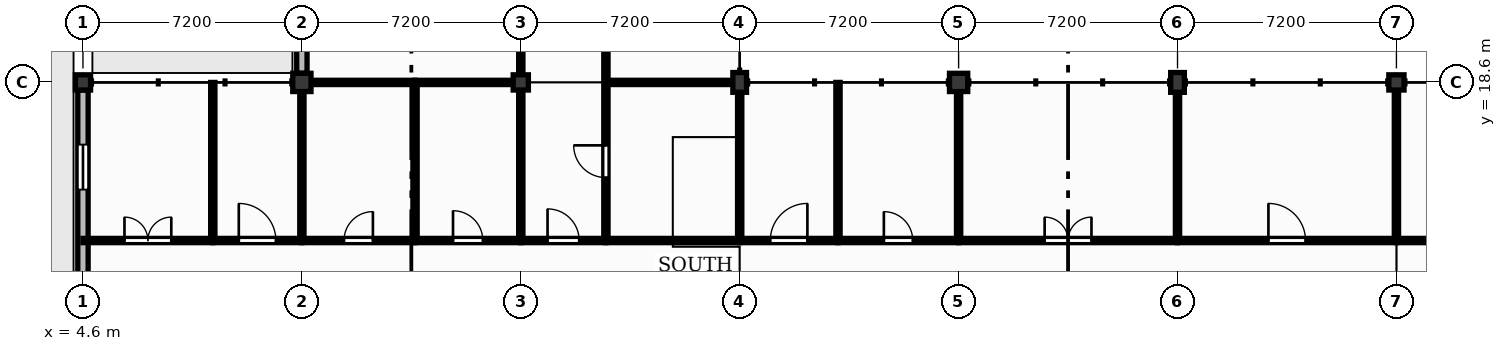
"""IFC4 building model, lengths in metres.
Left out: names, types, materials, properties, quantities, classifications, styles, units other than length and angle.
Written with IfcOpenShell. Run it as: python <this file> out.ifc"""

import sys

from ifc_helpers import new_model, si_unit, direction, frame, frame_2d, origin, origin_2d, place, context, subcontext, project, spatial, rectangle, extrude, element, fill, save


model = new_model("IFC4")
c1 = context("Model", 3, precision=1e-05, world=origin(), true_north=direction((0.0, 1.0)))
c2 = subcontext(c1, "Body", "Model", "MODEL_VIEW")
j1 = project(units=[si_unit("LENGTHUNIT", "METRE"), si_unit("PLANEANGLEUNIT", "RADIAN")], contexts=[c1])
p1 = place(None, origin())
s1 = spatial("IfcSite", under=j1, at=p1, CompositionType="ELEMENT")
p2 = place(p1, origin())
s2 = spatial("IfcBuilding", under=s1, at=p2, CompositionType="ELEMENT")
p3 = place(p2, origin())
s3 = spatial("IfcBuildingStorey", under=s2, at=p3, CompositionType="ELEMENT", Elevation=0.0)
p4 = place(p3, frame((4.6, 18.6, 0.0), z_axis=(0.0, 0.0, 1.0), x_axis=(1.0, 0.0, 0.0)))
e1 = element("IfcColumn", 1, at=p4, inside=s3, PredefinedType="COLUMN", context=c2, shape_type="SweptSolid", body=[
    extrude(rectangle(XDim=0.5, YDim=0.5, at=origin_2d()), origin(), (0.0, 0.0, 1.0), 4.2),
])
p5 = place(p3, frame((11.8, 18.6, 0.0), z_axis=(0.0, 0.0, 1.0), x_axis=(1.0, 0.0, 0.0)))
e2 = element("IfcColumn", 2, at=p5, inside=s3, PredefinedType="COLUMN", context=c2, shape_type="SweptSolid", body=[
    extrude(rectangle(XDim=0.6, YDim=0.6, at=origin_2d()), origin(), (0.0, 0.0, 1.0), 4.2),
])
p6 = place(p3, frame((19.0, 18.6, 0.0), z_axis=(0.0, 0.0, 1.0), x_axis=(1.0, 0.0, 0.0)))
e3 = element("IfcColumn", 3, at=p6, inside=s3, PredefinedType="COLUMN", context=c2, shape_type="SweptSolid", body=[
    extrude(rectangle(XDim=0.5, YDim=0.5, at=origin_2d()), origin(), (0.0, 0.0, 1.0), 4.2),
])
p7 = place(p3, frame((26.2, 18.6, 0.0), z_axis=(0.0, 0.0, 1.0), x_axis=(1.0, 0.0, 0.0)))
e4 = element("IfcColumn", 4, at=p7, inside=s3, PredefinedType="COLUMN", context=c2, shape_type="SweptSolid", body=[
    extrude(rectangle(XDim=0.45, YDim=0.65, at=origin_2d()), origin(), (0.0, 0.0, 1.0), 4.2),
])
p8 = place(p3, frame((33.4, 18.6, 0.0), z_axis=(0.0, 0.0, 1.0), x_axis=(1.0, 0.0, 0.0)))
e5 = element("IfcColumn", 5, at=p8, inside=s3, PredefinedType="COLUMN", context=c2, shape_type="SweptSolid", body=[
    extrude(rectangle(XDim=0.6, YDim=0.6, at=origin_2d()), origin(), (0.0, 0.0, 1.0), 4.2),
])
p9 = place(p3, frame((40.6, 18.6, 0.0), z_axis=(0.0, 0.0, 1.0), x_axis=(1.0, 0.0, 0.0)))
e6 = element("IfcColumn", 6, at=p9, inside=s3, PredefinedType="COLUMN", context=c2, shape_type="SweptSolid", body=[
    extrude(rectangle(XDim=0.45, YDim=0.65, at=origin_2d()), origin(), (0.0, 0.0, 1.0), 4.2),
])
p10 = place(p3, frame((47.8, 18.6, 0.0), z_axis=(0.0, 0.0, 1.0), x_axis=(1.0, 0.0, 0.0)))
e7 = element("IfcColumn", 7, at=p10, inside=s3, PredefinedType="COLUMN", context=c2, shape_type="SweptSolid", body=[
    extrude(rectangle(XDim=0.5, YDim=0.5, at=origin_2d()), origin(), (0.0, 0.0, 1.0), 4.2),
])
p11 = place(p3, frame((4.6, 11.65, 0.0), z_axis=(0.0, 0.0, 1.0), x_axis=(0.0, 1.0, 0.0)))
e8 = element("IfcWall", 8, at=p11, inside=s3, PredefinedType="SOLIDWALL", context=c2, shape_type="SweptSolid", body=[
    extrude(rectangle(XDim=6.7, YDim=0.34, at=frame_2d((3.35, 0.0))), origin(), (0.0, 0.0, 1.0), 3.68),
])
p12 = place(p11, frame((3.425, 0.0, 1.0)))
e9 = element("IfcOpeningElement", 9, at=p12, cuts=e8, PredefinedType="OPENING", context=c2, shape_type="SweptSolid", body=[
    extrude(rectangle(XDim=1.48, YDim=2.2, at=frame_2d((0.74, 1.1))), frame((0.0, 0.18, 0.0), z_axis=(0.0, -1.0, 0.0), x_axis=(1.0, 0.0, 0.0)), (0.0, 0.0, 1.0), 0.36),
])
p13 = place(p3, frame((11.8, 18.9, 0.0), z_axis=(0.0, 0.0, 1.0), x_axis=(0.0, 1.0, 0.0)))
e10 = element("IfcWall", 10, at=p13, inside=s3, PredefinedType="SOLIDWALL", context=c2, shape_type="SweptSolid", body=[
    extrude(rectangle(XDim=7.975, YDim=0.34, at=frame_2d((3.988, 0.0))), origin(), (0.0, 0.0, 1.0), 3.68),
])
p14 = place(p13, frame((2.788, 0.0, 0.0)))
e11 = element("IfcOpeningElement", 11, at=p14, cuts=e10, PredefinedType="OPENING", context=c2, shape_type="SweptSolid", body=[
    extrude(rectangle(XDim=2.4, YDim=2.8, at=frame_2d((1.2, 1.4))), frame((0.0, 0.18, 0.0), z_axis=(0.0, -1.0, 0.0), x_axis=(1.0, 0.0, 0.0)), (0.0, 0.0, 1.0), 0.36),
])
p15 = place(p13, frame((0.864, 0.0, 1.05)))
e12 = element("IfcOpeningElement", 12, at=p15, cuts=e10, PredefinedType="OPENING", context=c2, shape_type="SweptSolid", body=[
    extrude(rectangle(XDim=1.12, YDim=1.65, at=frame_2d((0.56, 0.825))), frame((0.0, 0.18, 0.0), z_axis=(0.0, -1.0, 0.0), x_axis=(1.0, 0.0, 0.0)), (0.0, 0.0, 1.0), 0.36),
])
p16 = place(p13, frame((5.921, 0.0, 1.05)))
e13 = element("IfcOpeningElement", 13, at=p16, cuts=e10, PredefinedType="OPENING", context=c2, shape_type="SweptSolid", body=[
    extrude(rectangle(XDim=1.26, YDim=1.65, at=frame_2d((0.63, 0.825))), frame((0.0, 0.18, 0.0), z_axis=(0.0, -1.0, 0.0), x_axis=(1.0, 0.0, 0.0)), (0.0, 0.0, 1.0), 0.36),
])
p17 = place(p3, frame((4.6, 13.4, 0.0), z_axis=(0.0, 0.0, 1.0), x_axis=(1.0, 0.0, 0.0)))
e14 = element("IfcWall", 14, at=p17, inside=s3, PredefinedType="PARTITIONING", context=c2, shape_type="SweptSolid", body=[
    extrude(rectangle(XDim=4.27, YDim=0.14, at=frame_2d((2.135, 0.0))), origin(), (0.0, 0.0, 1.0), 4.18),
])
p18 = place(p17, frame((1.365, 0.0, 0.0)))
e15 = element("IfcOpeningElement", 15, at=p18, cuts=e14, PredefinedType="OPENING", context=c2, shape_type="SweptSolid", body=[
    extrude(rectangle(XDim=1.54, YDim=2.25, at=frame_2d((0.77, 1.125))), frame((0.0, 0.08, 0.0), z_axis=(0.0, -1.0, 0.0), x_axis=(1.0, 0.0, 0.0)), (0.0, 0.0, 1.0), 0.16),
])
p19 = place(p3, frame((8.87, 13.47, 0.0), z_axis=(0.0, 0.0, 1.0), x_axis=(0.0, 1.0, 0.0)))
e16 = element("IfcWall", 16, at=p19, inside=s3, PredefinedType="PARTITIONING", context=c2, shape_type="SweptSolid", body=[
    extrude(rectangle(XDim=5.13, YDim=0.14, at=frame_2d((2.565, 0.0))), origin(), (0.0, 0.0, 1.0), 4.18),
])
p20 = place(p3, frame((8.87, 13.4, 0.0), z_axis=(0.0, 0.0, 1.0), x_axis=(1.0, 0.0, 0.0)))
e17 = element("IfcWall", 17, at=p20, inside=s3, PredefinedType="PARTITIONING", context=c2, shape_type="SweptSolid", body=[
    extrude(rectangle(XDim=2.93, YDim=0.14, at=frame_2d((1.465, 0.0))), origin(), (0.0, 0.0, 1.0), 4.18),
])
p21 = place(p20, frame((0.855, 0.0, 0.0)))
e18 = element("IfcOpeningElement", 18, at=p21, cuts=e17, PredefinedType="OPENING", context=c2, shape_type="SweptSolid", body=[
    extrude(rectangle(XDim=1.22, YDim=2.1, at=frame_2d((0.61, 1.05))), frame((0.0, 0.08, 0.0), z_axis=(0.0, -1.0, 0.0), x_axis=(1.0, 0.0, 0.0)), (0.0, 0.0, 1.0), 0.16),
])
p22 = place(p3, frame((11.8, 13.47, 0.0), z_axis=(0.0, 0.0, 1.0), x_axis=(0.0, 1.0, 0.0)))
e19 = element("IfcWall", 19, at=p22, inside=s3, PredefinedType="PARTITIONING", context=c2, shape_type="SweptSolid", body=[
    extrude(rectangle(XDim=4.83, YDim=0.14, at=frame_2d((2.415, 0.0))), origin(), (0.0, 0.0, 1.0), 3.5),
])
p23 = place(p3, frame((11.8, 13.4, 0.0), z_axis=(0.0, 0.0, 1.0), x_axis=(1.0, 0.0, 0.0)))
e20 = element("IfcWall", 20, at=p23, inside=s3, PredefinedType="PARTITIONING", context=c2, shape_type="SweptSolid", body=[
    extrude(rectangle(XDim=3.722, YDim=0.14, at=frame_2d((1.861, 0.0))), origin(), (0.0, 0.0, 1.0), 4.18),
])
p24 = place(p23, frame((1.386, 0.0, 0.0)))
e21 = element("IfcOpeningElement", 21, at=p24, cuts=e20, PredefinedType="OPENING", context=c2, shape_type="SweptSolid", body=[
    extrude(rectangle(XDim=0.95, YDim=2.1, at=frame_2d((0.475, 1.05))), frame((0.0, 0.08, 0.0), z_axis=(0.0, -1.0, 0.0), x_axis=(1.0, 0.0, 0.0)), (0.0, 0.0, 1.0), 0.16),
])
p25 = place(p3, frame((12.1, 18.6, 0.0), z_axis=(0.0, 0.0, 1.0), x_axis=(1.0, 0.0, 0.0)))
e22 = element("IfcWall", 22, at=p25, inside=s3, PredefinedType="PARTITIONING", context=c2, shape_type="SweptSolid", body=[
    extrude(rectangle(XDim=3.422, YDim=0.14, at=frame_2d((1.711, 0.0))), origin(), (0.0, 0.0, 1.0), 3.25),
])
p26 = place(p3, frame((15.522, 13.47, 0.0), z_axis=(0.0, 0.0, 1.0), x_axis=(0.0, 1.0, 0.0)))
e23 = element("IfcWall", 23, at=p26, inside=s3, PredefinedType="PARTITIONING", context=c2, shape_type="SweptSolid", body=[
    extrude(rectangle(XDim=5.06, YDim=0.14, at=frame_2d((2.53, 0.0))), origin(), (0.0, 0.0, 1.0), 4.18),
])
p27 = place(p3, frame((15.522, 13.4, 0.0), z_axis=(0.0, 0.0, 1.0), x_axis=(1.0, 0.0, 0.0)))
e24 = element("IfcWall", 24, at=p27, inside=s3, PredefinedType="PARTITIONING", context=c2, shape_type="SweptSolid", body=[
    extrude(rectangle(XDim=3.478, YDim=0.14, at=frame_2d((1.739, 0.0))), origin(), (0.0, 0.0, 1.0), 4.18),
])
p28 = place(p27, frame((1.249, 0.0, 0.0)))
e25 = element("IfcOpeningElement", 25, at=p28, cuts=e24, PredefinedType="OPENING", context=c2, shape_type="SweptSolid", body=[
    extrude(rectangle(XDim=0.98, YDim=2.15, at=frame_2d((0.49, 1.075))), frame((0.0, 0.08, 0.0), z_axis=(0.0, -1.0, 0.0), x_axis=(1.0, 0.0, 0.0)), (0.0, 0.0, 1.0), 0.16),
])
p29 = place(p3, frame((15.522, 18.6, 0.0), z_axis=(0.0, 0.0, 1.0), x_axis=(1.0, 0.0, 0.0)))
e26 = element("IfcWall", 26, at=p29, inside=s3, PredefinedType="PARTITIONING", context=c2, shape_type="SweptSolid", body=[
    extrude(rectangle(XDim=3.228, YDim=0.14, at=frame_2d((1.614, 0.0))), origin(), (0.0, 0.0, 1.0), 3.25),
])
p30 = place(p3, frame((19.0, 13.47, 0.0), z_axis=(0.0, 0.0, 1.0), x_axis=(0.0, 1.0, 0.0)))
e27 = element("IfcWall", 27, at=p30, inside=s3, PredefinedType="PARTITIONING", context=c2, shape_type="SweptSolid", body=[
    extrude(rectangle(XDim=4.88, YDim=0.14, at=frame_2d((2.44, 0.0))), origin(), (0.0, 0.0, 1.0), 3.5),
])
p31 = place(p3, frame((19.0, 13.4, 0.0), z_axis=(0.0, 0.0, 1.0), x_axis=(1.0, 0.0, 0.0)))
e28 = element("IfcWall", 28, at=p31, inside=s3, PredefinedType="PARTITIONING", context=c2, shape_type="SweptSolid", body=[
    extrude(rectangle(XDim=2.8, YDim=0.14, at=frame_2d((1.4, 0.0))), origin(), (0.0, 0.0, 1.0), 4.18),
])
p32 = place(p31, frame((0.88, 0.0, 0.0)))
e29 = element("IfcOpeningElement", 29, at=p32, cuts=e28, PredefinedType="OPENING", context=c2, shape_type="SweptSolid", body=[
    extrude(rectangle(XDim=1.04, YDim=2.1, at=frame_2d((0.52, 1.05))), frame((0.0, 0.08, 0.0), z_axis=(0.0, -1.0, 0.0), x_axis=(1.0, 0.0, 0.0)), (0.0, 0.0, 1.0), 0.16),
])
p33 = place(p3, frame((19.0, 18.85, 0.0), z_axis=(0.0, 0.0, 1.0), x_axis=(0.0, 1.0, 0.0)))
e30 = element("IfcWall", 30, at=p33, inside=s3, PredefinedType="PARTITIONING", context=c2, shape_type="SweptSolid", body=[
    extrude(rectangle(XDim=8.1, YDim=0.14, at=frame_2d((4.05, 0.0))), origin(), (0.0, 0.0, 1.0), 3.68),
])
p34 = place(p33, frame((3.47, 0.0, 0.0)))
e31 = element("IfcOpeningElement", 31, at=p34, cuts=e30, PredefinedType="OPENING", context=c2, shape_type="SweptSolid", body=[
    extrude(rectangle(XDim=1.16, YDim=2.1, at=frame_2d((0.58, 1.05))), frame((0.0, 0.08, 0.0), z_axis=(0.0, -1.0, 0.0), x_axis=(1.0, 0.0, 0.0)), (0.0, 0.0, 1.0), 0.16),
])
p35 = place(p3, frame((21.8, 13.47, 0.0), z_axis=(0.0, 0.0, 1.0), x_axis=(0.0, 1.0, 0.0)))
e32 = element("IfcWall", 32, at=p35, inside=s3, PredefinedType="PARTITIONING", context=c2, shape_type="SweptSolid", body=[
    extrude(rectangle(XDim=5.06, YDim=0.14, at=frame_2d((2.53, 0.0))), origin(), (0.0, 0.0, 1.0), 4.18),
])
p36 = place(p35, frame((2.0, 0.0, 0.0)))
e33 = element("IfcOpeningElement", 33, at=p36, cuts=e32, PredefinedType="OPENING", context=c2, shape_type="SweptSolid", body=[
    extrude(rectangle(XDim=1.06, YDim=2.15, at=frame_2d((0.53, 1.075))), frame((0.0, 0.08, 0.0), z_axis=(0.0, -1.0, 0.0), x_axis=(1.0, 0.0, 0.0)), (0.0, 0.0, 1.0), 0.16),
])
p37 = place(p3, frame((21.8, 13.4, 0.0), z_axis=(0.0, 0.0, 1.0), x_axis=(1.0, 0.0, 0.0)))
e34 = element("IfcWall", 34, at=p37, inside=s3, PredefinedType="PARTITIONING", context=c2, shape_type="SweptSolid", body=[
    extrude(rectangle(XDim=4.4, YDim=0.14, at=frame_2d((2.2, 0.0))), origin(), (0.0, 0.0, 1.0), 4.18),
])
p38 = place(p3, frame((21.8, 18.67, 0.0), z_axis=(0.0, 0.0, 1.0), x_axis=(0.0, 1.0, 0.0)))
e35 = element("IfcWall", 35, at=p38, inside=s3, PredefinedType="PARTITIONING", context=c2, shape_type="SweptSolid", body=[
    extrude(rectangle(XDim=8.46, YDim=0.14, at=frame_2d((4.23, 0.0))), origin(), (0.0, 0.0, 1.0), 4.18),
])
p39 = place(p38, frame((3.46, 0.0, 0.0)))
e36 = element("IfcOpeningElement", 36, at=p39, cuts=e35, PredefinedType="OPENING", context=c2, shape_type="SweptSolid", body=[
    extrude(rectangle(XDim=1.54, YDim=2.25, at=frame_2d((0.77, 1.125))), frame((0.0, 0.08, 0.0), z_axis=(0.0, -1.0, 0.0), x_axis=(1.0, 0.0, 0.0)), (0.0, 0.0, 1.0), 0.16),
])
p40 = place(p3, frame((21.8, 18.6, 0.0), z_axis=(0.0, 0.0, 1.0), x_axis=(1.0, 0.0, 0.0)))
e37 = element("IfcWall", 37, at=p40, inside=s3, PredefinedType="PARTITIONING", context=c2, shape_type="SweptSolid", body=[
    extrude(rectangle(XDim=4.175, YDim=0.14, at=frame_2d((2.087, 0.0))), origin(), (0.0, 0.0, 1.0), 3.25),
])
p41 = place(p3, frame((26.2, 13.47, 0.0), z_axis=(0.0, 0.0, 1.0), x_axis=(0.0, 1.0, 0.0)))
e38 = element("IfcWall", 38, at=p41, inside=s3, PredefinedType="PARTITIONING", context=c2, shape_type="SweptSolid", body=[
    extrude(rectangle(XDim=4.805, YDim=0.14, at=frame_2d((2.402, 0.0))), origin(), (0.0, 0.0, 1.0), 3.5),
])
p42 = place(p3, frame((26.2, 13.4, 0.0), z_axis=(0.0, 0.0, 1.0), x_axis=(1.0, 0.0, 0.0)))
e39 = element("IfcWall", 39, at=p42, inside=s3, PredefinedType="PARTITIONING", context=c2, shape_type="SweptSolid", body=[
    extrude(rectangle(XDim=3.233, YDim=0.14, at=frame_2d((1.617, 0.0))), origin(), (0.0, 0.0, 1.0), 4.18),
])
p43 = place(p42, frame((1.007, 0.0, 0.0)))
e40 = element("IfcOpeningElement", 40, at=p43, cuts=e39, PredefinedType="OPENING", context=c2, shape_type="SweptSolid", body=[
    extrude(rectangle(XDim=1.22, YDim=2.1, at=frame_2d((0.61, 1.05))), frame((0.0, 0.08, 0.0), z_axis=(0.0, -1.0, 0.0), x_axis=(1.0, 0.0, 0.0)), (0.0, 0.0, 1.0), 0.16),
])
p44 = place(p3, frame((29.433, 13.47, 0.0), z_axis=(0.0, 0.0, 1.0), x_axis=(0.0, 1.0, 0.0)))
e41 = element("IfcWall", 41, at=p44, inside=s3, PredefinedType="PARTITIONING", context=c2, shape_type="SweptSolid", body=[
    extrude(rectangle(XDim=5.13, YDim=0.14, at=frame_2d((2.565, 0.0))), origin(), (0.0, 0.0, 1.0), 4.18),
])
p45 = place(p3, frame((29.433, 13.4, 0.0), z_axis=(0.0, 0.0, 1.0), x_axis=(1.0, 0.0, 0.0)))
e42 = element("IfcWall", 42, at=p45, inside=s3, PredefinedType="PARTITIONING", context=c2, shape_type="SweptSolid", body=[
    extrude(rectangle(XDim=3.967, YDim=0.14, at=frame_2d((1.983, 0.0))), origin(), (0.0, 0.0, 1.0), 4.18),
])
p46 = place(p45, frame((1.509, 0.0, 0.0)))
e43 = element("IfcOpeningElement", 43, at=p46, cuts=e42, PredefinedType="OPENING", context=c2, shape_type="SweptSolid", body=[
    extrude(rectangle(XDim=0.95, YDim=2.1, at=frame_2d((0.475, 1.05))), frame((0.0, 0.08, 0.0), z_axis=(0.0, -1.0, 0.0), x_axis=(1.0, 0.0, 0.0)), (0.0, 0.0, 1.0), 0.16),
])
p47 = place(p3, frame((33.4, 13.47, 0.0), z_axis=(0.0, 0.0, 1.0), x_axis=(0.0, 1.0, 0.0)))
e44 = element("IfcWall", 44, at=p47, inside=s3, PredefinedType="PARTITIONING", context=c2, shape_type="SweptSolid", body=[
    extrude(rectangle(XDim=4.83, YDim=0.14, at=frame_2d((2.415, 0.0))), origin(), (0.0, 0.0, 1.0), 3.5),
])
p48 = place(p3, frame((33.4, 13.4, 0.0), z_axis=(0.0, 0.0, 1.0), x_axis=(1.0, 0.0, 0.0)))
e45 = element("IfcWall", 45, at=p48, inside=s3, PredefinedType="PARTITIONING", context=c2, shape_type="SweptSolid", body=[
    extrude(rectangle(XDim=7.2, YDim=0.14, at=frame_2d((3.6, 0.0))), origin(), (0.0, 0.0, 1.0), 4.18),
])
p49 = place(p48, frame((2.83, 0.0, 0.0)))
e46 = element("IfcOpeningElement", 46, at=p49, cuts=e45, PredefinedType="OPENING", context=c2, shape_type="SweptSolid", body=[
    extrude(rectangle(XDim=1.54, YDim=2.25, at=frame_2d((0.77, 1.125))), frame((0.0, 0.08, 0.0), z_axis=(0.0, -1.0, 0.0), x_axis=(1.0, 0.0, 0.0)), (0.0, 0.0, 1.0), 0.16),
])
p50 = place(p3, frame((40.6, 13.47, 0.0), z_axis=(0.0, 0.0, 1.0), x_axis=(0.0, 1.0, 0.0)))
e47 = element("IfcWall", 47, at=p50, inside=s3, PredefinedType="PARTITIONING", context=c2, shape_type="SweptSolid", body=[
    extrude(rectangle(XDim=4.805, YDim=0.14, at=frame_2d((2.402, 0.0))), origin(), (0.0, 0.0, 1.0), 3.5),
])
p51 = place(p3, frame((40.6, 13.4, 0.0), z_axis=(0.0, 0.0, 1.0), x_axis=(1.0, 0.0, 0.0)))
e48 = element("IfcWall", 48, at=p51, inside=s3, PredefinedType="PARTITIONING", context=c2, shape_type="SweptSolid", body=[
    extrude(rectangle(XDim=7.2, YDim=0.14, at=frame_2d((3.6, 0.0))), origin(), (0.0, 0.0, 1.0), 4.18),
])
p52 = place(p51, frame((2.99, 0.0, 0.0)))
e49 = element("IfcOpeningElement", 49, at=p52, cuts=e48, PredefinedType="OPENING", context=c2, shape_type="SweptSolid", body=[
    extrude(rectangle(XDim=1.22, YDim=2.1, at=frame_2d((0.61, 1.05))), frame((0.0, 0.08, 0.0), z_axis=(0.0, -1.0, 0.0), x_axis=(1.0, 0.0, 0.0)), (0.0, 0.0, 1.0), 0.16),
])
p53 = place(p3, frame((47.8, 13.47, 0.0), z_axis=(0.0, 0.0, 1.0), x_axis=(0.0, 1.0, 0.0)))
e50 = element("IfcWall", 50, at=p53, inside=s3, PredefinedType="PARTITIONING", context=c2, shape_type="SweptSolid", body=[
    extrude(rectangle(XDim=4.88, YDim=0.14, at=frame_2d((2.44, 0.0))), origin(), (0.0, 0.0, 1.0), 3.5),
])
p54 = place(p3, frame((47.8, 13.4, 0.0), z_axis=(0.0, 0.0, 1.0), x_axis=(1.0, 0.0, 0.0)))
e51 = element("IfcWall", 51, at=p54, inside=s3, PredefinedType="PARTITIONING", context=c2, shape_type="SweptSolid", body=[
    extrude(rectangle(XDim=3.722, YDim=0.14, at=frame_2d((1.861, 0.0))), origin(), (0.0, 0.0, 1.0), 4.18),
])
p55 = place(p54, frame((1.371, 0.0, 0.0)))
e52 = element("IfcOpeningElement", 52, at=p55, cuts=e51, PredefinedType="OPENING", context=c2, shape_type="SweptSolid", body=[
    extrude(rectangle(XDim=0.98, YDim=2.15, at=frame_2d((0.49, 1.075))), frame((0.0, 0.08, 0.0), z_axis=(0.0, -1.0, 0.0), x_axis=(1.0, 0.0, 0.0)), (0.0, 0.0, 1.0), 0.16),
])
p56 = place(p12, origin())
e53 = element("IfcWindow", 53, at=p56, inside=s3, PartitioningType="SINGLE_PANEL", PredefinedType="WINDOW", context=c2, shape_type="SweptSolid", body=[
    extrude(rectangle(XDim=1.48, YDim=2.2, at=frame_2d((0.74, 1.1))), frame((0.0, 0.03, 0.0), z_axis=(0.0, -1.0, 0.0), x_axis=(1.0, 0.0, 0.0)), (0.0, 0.0, 1.0), 0.06),
])
fill(e9, e53)
p57 = place(p32, origin())
e54 = element("IfcDoor", 54, at=p57, inside=s3, OperationType="SINGLE_SWING_LEFT", PredefinedType="DOOR", context=c2, shape_type="SweptSolid", body=[
    extrude(rectangle(XDim=1.04, YDim=2.1, at=frame_2d((0.52, 1.05))), frame((0.0, 0.025, 0.0), z_axis=(0.0, -1.0, 0.0), x_axis=(1.0, 0.0, 0.0)), (0.0, 0.0, 1.0), 0.05),
])
fill(e29, e54)
p58 = place(p18, origin())
e55 = element("IfcDoor", 55, at=p58, inside=s3, OperationType="DOUBLE_DOOR_SINGLE_SWING", PredefinedType="DOOR", context=c2, shape_type="SweptSolid", body=[
    extrude(rectangle(XDim=1.54, YDim=2.25, at=frame_2d((0.77, 1.125))), frame((0.0, 0.025, 0.0), z_axis=(0.0, -1.0, 0.0), x_axis=(1.0, 0.0, 0.0)), (0.0, 0.0, 1.0), 0.05),
])
fill(e15, e55)
p59 = place(p21, origin())
e56 = element("IfcDoor", 56, at=p59, inside=s3, OperationType="SINGLE_SWING_LEFT", PredefinedType="DOOR", context=c2, shape_type="SweptSolid", body=[
    extrude(rectangle(XDim=1.22, YDim=2.1, at=frame_2d((0.61, 1.05))), frame((0.0, 0.025, 0.0), z_axis=(0.0, -1.0, 0.0), x_axis=(1.0, 0.0, 0.0)), (0.0, 0.0, 1.0), 0.05),
])
fill(e18, e56)
p60 = place(p24, origin())
e57 = element("IfcDoor", 57, at=p60, inside=s3, OperationType="SINGLE_SWING_RIGHT", PredefinedType="DOOR", context=c2, shape_type="SweptSolid", body=[
    extrude(rectangle(XDim=0.95, YDim=2.1, at=frame_2d((0.475, 1.05))), frame((0.0, 0.025, 0.0), z_axis=(0.0, -1.0, 0.0), x_axis=(1.0, 0.0, 0.0)), (0.0, 0.0, 1.0), 0.05),
])
fill(e21, e57)
p61 = place(p28, origin())
e58 = element("IfcDoor", 58, at=p61, inside=s3, OperationType="SINGLE_SWING_LEFT", PredefinedType="DOOR", context=c2, shape_type="SweptSolid", body=[
    extrude(rectangle(XDim=0.98, YDim=2.15, at=frame_2d((0.49, 1.075))), frame((0.0, 0.025, 0.0), z_axis=(0.0, -1.0, 0.0), x_axis=(1.0, 0.0, 0.0)), (0.0, 0.0, 1.0), 0.05),
])
fill(e25, e58)
p62 = place(p36, origin())
e59 = element("IfcDoor", 59, at=p62, inside=s3, OperationType="SINGLE_SWING_RIGHT", PredefinedType="DOOR", context=c2, shape_type="SweptSolid", body=[
    extrude(rectangle(XDim=1.06, YDim=2.15, at=frame_2d((0.53, 1.075))), frame((0.0, 0.025, 0.0), z_axis=(0.0, -1.0, 0.0), x_axis=(1.0, 0.0, 0.0)), (0.0, 0.0, 1.0), 0.05),
])
fill(e33, e59)
p63 = place(p43, origin())
e60 = element("IfcDoor", 60, at=p63, inside=s3, OperationType="SINGLE_SWING_RIGHT", PredefinedType="DOOR", context=c2, shape_type="SweptSolid", body=[
    extrude(rectangle(XDim=1.22, YDim=2.1, at=frame_2d((0.61, 1.05))), frame((0.0, 0.025, 0.0), z_axis=(0.0, -1.0, 0.0), x_axis=(1.0, 0.0, 0.0)), (0.0, 0.0, 1.0), 0.05),
])
fill(e40, e60)
p64 = place(p46, origin())
e61 = element("IfcDoor", 61, at=p64, inside=s3, OperationType="SINGLE_SWING_LEFT", PredefinedType="DOOR", context=c2, shape_type="SweptSolid", body=[
    extrude(rectangle(XDim=0.95, YDim=2.1, at=frame_2d((0.475, 1.05))), frame((0.0, 0.025, 0.0), z_axis=(0.0, -1.0, 0.0), x_axis=(1.0, 0.0, 0.0)), (0.0, 0.0, 1.0), 0.05),
])
fill(e43, e61)
p65 = place(p49, origin())
e62 = element("IfcDoor", 62, at=p65, inside=s3, OperationType="DOUBLE_DOOR_SINGLE_SWING", PredefinedType="DOOR", context=c2, shape_type="SweptSolid", body=[
    extrude(rectangle(XDim=1.54, YDim=2.25, at=frame_2d((0.77, 1.125))), frame((0.0, 0.025, 0.0), z_axis=(0.0, -1.0, 0.0), x_axis=(1.0, 0.0, 0.0)), (0.0, 0.0, 1.0), 0.05),
])
fill(e46, e62)
p66 = place(p52, origin())
e63 = element("IfcDoor", 63, at=p66, inside=s3, OperationType="SINGLE_SWING_LEFT", PredefinedType="DOOR", context=c2, shape_type="SweptSolid", body=[
    extrude(rectangle(XDim=1.22, YDim=2.1, at=frame_2d((0.61, 1.05))), frame((0.0, 0.025, 0.0), z_axis=(0.0, -1.0, 0.0), x_axis=(1.0, 0.0, 0.0)), (0.0, 0.0, 1.0), 0.05),
])
fill(e49, e63)
save(model, sys.argv[1])
